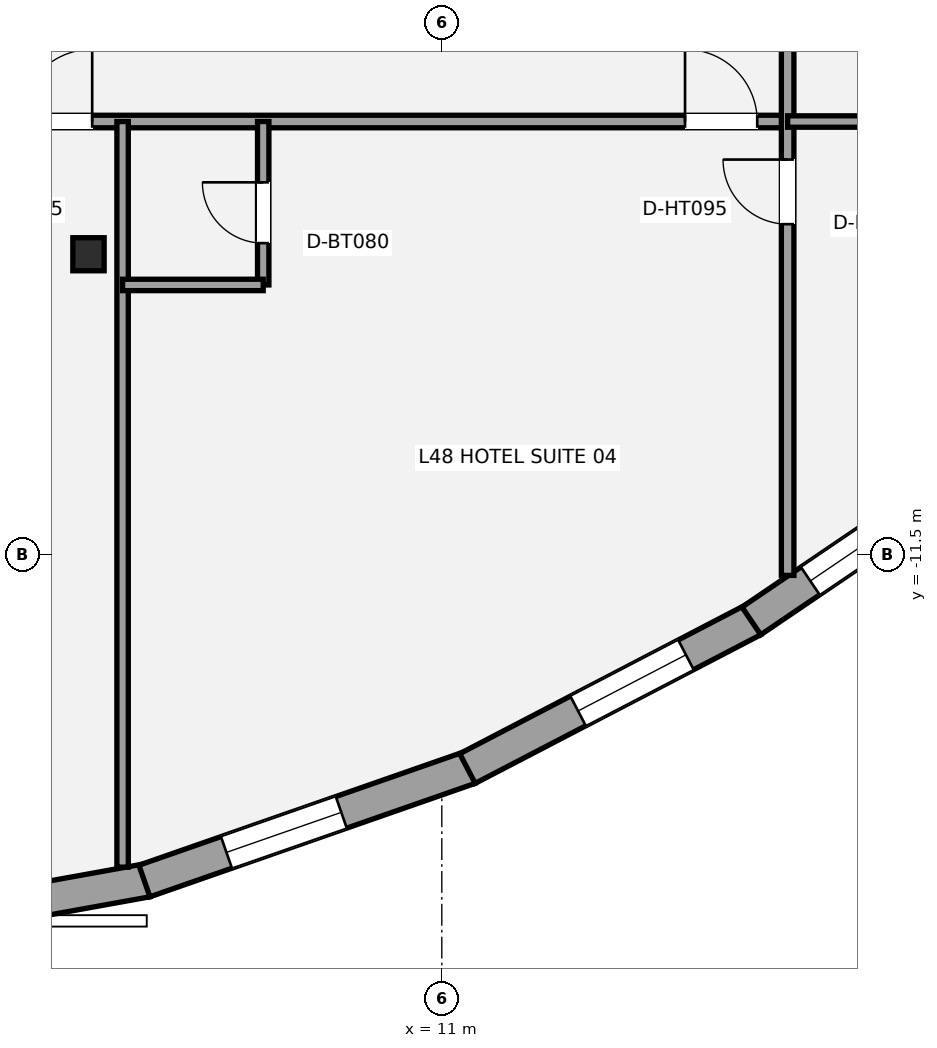
"""IFC4 building model, lengths in metres.
Left out: names, types, materials, properties, quantities, classifications, styles, units other than length and angle.
Written with IfcOpenShell. Run it as: python <this file> out.ifc"""

import sys

from ifc_helpers import new_model, si_unit, direction, frame, frame_2d, origin, origin_2d, place, context, subcontext, project, spatial, rectangle, i_section, extrude, element, fill, save


model = new_model("IFC4")
c1 = context("Model", 3, precision=1e-05, world=origin(), true_north=direction((0.0, 1.0)))
c2 = subcontext(c1, "Body", "Model", "MODEL_VIEW")
j1 = project(units=[si_unit("LENGTHUNIT", "METRE"), si_unit("PLANEANGLEUNIT", "RADIAN")], contexts=[c1])
p1 = place(None, origin())
s1 = spatial("IfcSite", under=j1, at=p1, CompositionType="ELEMENT")
p2 = place(p1, origin())
s2 = spatial("IfcBuilding", under=s1, at=p2, CompositionType="ELEMENT")
p3 = place(p2, frame((0.0, 0.0, 175.8)))
s3 = spatial("IfcBuildingStorey", under=s2, at=p3, CompositionType="ELEMENT", Elevation=175.8)
p4 = place(p3, frame((6.351, -7.546, 0.0), z_axis=(0.0, 0.0, 1.0), x_axis=(1.0, 0.0, 0.0)))
e1 = element("IfcColumn", 1, at=p4, inside=s3, PredefinedType="COLUMN", context=c2, shape_type="SweptSolid", body=[
    extrude(i_section(OverallWidth=0.412, OverallDepth=0.435, WebThickness=0.036, FlangeThickness=0.057, at=origin_2d()), origin(), (0.0, 0.0, 1.0), 3.2),
])
p5 = place(p3, frame((7.12, -15.783, 0.0), z_axis=(0.0, 0.0, 1.0), x_axis=(-0.984108907768, -0.177565924803, 0.0)))
e2 = element("IfcWall", 2, at=p5, inside=s3, PredefinedType="STANDARD", context=c2, shape_type="SweptSolid", body=[
    extrude(rectangle(XDim=4.788, YDim=0.44, at=frame_2d((2.394, 0.0))), origin(), (0.0, 0.0, 1.0), 2.315),
])
p6 = place(p5, frame((1.345, 0.0, 0.58)))
e3 = element("IfcOpeningElement", 3, at=p6, cuts=e2, PredefinedType="OPENING", context=c2, shape_type="SweptSolid", body=[
    extrude(rectangle(XDim=1.6, YDim=1.55, at=frame_2d((0.8, 0.775))), frame((0.0, 0.23, 0.0), z_axis=(0.0, -1.0, 0.0), x_axis=(1.0, 0.0, 0.0)), (0.0, 0.0, 1.0), 0.46),
])
p7 = place(p3, frame((11.366, -14.3, 0.0), z_axis=(0.0, 0.0, 1.0), x_axis=(-0.944223944927, -0.329304026434, 0.0)))
e4 = element("IfcWall", 4, at=p7, inside=s3, PredefinedType="STANDARD", context=c2, shape_type="SweptSolid", body=[
    extrude(rectangle(XDim=4.532, YDim=0.44, at=frame_2d((2.266, 0.0))), origin(), (0.0, 0.0, 1.0), 2.315),
])
p8 = place(p7, frame((1.789, 0.0, 0.58)))
e5 = element("IfcOpeningElement", 5, at=p8, cuts=e4, PredefinedType="OPENING", context=c2, shape_type="SweptSolid", body=[
    extrude(rectangle(XDim=1.6, YDim=1.55, at=frame_2d((0.8, 0.775))), frame((0.0, 0.23, 0.0), z_axis=(0.0, -1.0, 0.0), x_axis=(1.0, 0.0, 0.0)), (0.0, 0.0, 1.0), 0.46),
])
p9 = place(p3, frame((15.094, -12.357, 0.0), z_axis=(0.0, 0.0, 1.0), x_axis=(-0.887117685078, -0.461543294634, 0.0)))
e6 = element("IfcWall", 6, at=p9, inside=s3, PredefinedType="STANDARD", context=c2, shape_type="SweptSolid", body=[
    extrude(rectangle(XDim=4.235, YDim=0.44, at=frame_2d((2.118, 0.0))), origin(), (0.0, 0.0, 1.0), 2.315),
])
p10 = place(p9, frame((0.995, 0.0, 0.58)))
e7 = element("IfcOpeningElement", 7, at=p10, cuts=e6, PredefinedType="OPENING", context=c2, shape_type="SweptSolid", body=[
    extrude(rectangle(XDim=1.6, YDim=1.55, at=frame_2d((0.8, 0.775))), frame((0.0, 0.23, 0.0), z_axis=(0.0, -1.0, 0.0), x_axis=(1.0, 0.0, 0.0)), (0.0, 0.0, 1.0), 0.46),
])
p11 = place(p3, frame((18.393, -10.119, 0.0), z_axis=(0.0, 0.0, 1.0), x_axis=(-0.827746348969, -0.561102469937, 0.0)))
e8 = element("IfcWall", 8, at=p11, inside=s3, PredefinedType="STANDARD", context=c2, shape_type="SweptSolid", body=[
    extrude(rectangle(XDim=4.011, YDim=0.44, at=frame_2d((2.006, 0.0))), origin(), (0.0, 0.0, 1.0), 2.315),
])
p12 = place(p11, frame((1.674, 0.0, 0.58)))
e9 = element("IfcOpeningElement", 9, at=p12, cuts=e8, PredefinedType="OPENING", context=c2, shape_type="SweptSolid", body=[
    extrude(rectangle(XDim=1.4, YDim=1.55, at=frame_2d((0.7, 0.775))), frame((0.0, 0.23, 0.0), z_axis=(0.0, -1.0, 0.0), x_axis=(1.0, 0.0, 0.0)), (0.0, 0.0, 1.0), 0.46),
])
p13 = place(p3, frame((-15.55, -5.8, 0.0), z_axis=(0.0, 0.0, 1.0), x_axis=(1.0, 0.0, 0.0)))
e10 = element("IfcWall", 10, at=p13, inside=s3, PredefinedType="PARTITIONING", context=c2, shape_type="SweptSolid", body=[
    extrude(rectangle(XDim=31.1, YDim=0.165, at=frame_2d((15.55, 0.0))), origin(), (0.0, 0.0, 1.0), 2.398),
])
p14 = place(p13, frame((5.4, 0.0, 0.0)))
e11 = element("IfcOpeningElement", 11, at=p14, cuts=e10, PredefinedType="OPENING", context=c2, shape_type="SweptSolid", body=[
    extrude(rectangle(XDim=0.95, YDim=2.15, at=frame_2d((0.475, 1.075))), frame((0.0, 0.093, 0.0), z_axis=(0.0, -1.0, 0.0), x_axis=(1.0, 0.0, 0.0)), (0.0, 0.0, 1.0), 0.185),
])
p15 = place(p13, frame((13.2, 0.0, 0.0)))
e12 = element("IfcOpeningElement", 12, at=p15, cuts=e10, PredefinedType="OPENING", context=c2, shape_type="SweptSolid", body=[
    extrude(rectangle(XDim=0.95, YDim=2.15, at=frame_2d((0.475, 1.075))), frame((0.0, 0.093, 0.0), z_axis=(0.0, -1.0, 0.0), x_axis=(1.0, 0.0, 0.0)), (0.0, 0.0, 1.0), 0.185),
])
p16 = place(p13, frame((21.0, 0.0, 0.0)))
e13 = element("IfcOpeningElement", 13, at=p16, cuts=e10, PredefinedType="OPENING", context=c2, shape_type="SweptSolid", body=[
    extrude(rectangle(XDim=0.95, YDim=2.15, at=frame_2d((0.475, 1.075))), frame((0.0, 0.093, 0.0), z_axis=(0.0, -1.0, 0.0), x_axis=(1.0, 0.0, 0.0)), (0.0, 0.0, 1.0), 0.185),
])
p17 = place(p13, frame((29.75, 0.0, 0.0)))
e14 = element("IfcOpeningElement", 14, at=p17, cuts=e10, PredefinedType="OPENING", context=c2, shape_type="SweptSolid", body=[
    extrude(rectangle(XDim=0.95, YDim=2.15, at=frame_2d((0.475, 1.075))), frame((0.0, 0.093, 0.0), z_axis=(0.0, -1.0, 0.0), x_axis=(1.0, 0.0, 0.0)), (0.0, 0.0, 1.0), 0.185),
])
p18 = place(p3, frame((15.55, -11.771, 0.0), z_axis=(0.0, 0.0, 1.0), x_axis=(0.0, 1.0, 0.0)))
e15 = element("IfcWall", 15, at=p18, inside=s3, PredefinedType="PARTITIONING", context=c2, shape_type="SweptSolid", body=[
    extrude(rectangle(XDim=19.321, YDim=0.165, at=frame_2d((9.661, 0.0))), origin(), (0.0, 0.0, 1.0), 2.473),
])
p19 = place(p18, frame((4.621, 0.0, 0.0)))
e16 = element("IfcOpeningElement", 16, at=p19, cuts=e15, PredefinedType="OPENING", context=c2, shape_type="SweptSolid", body=[
    extrude(rectangle(XDim=0.85, YDim=2.1, at=frame_2d((0.425, 1.05))), frame((0.0, 0.093, 0.0), z_axis=(0.0, -1.0, 0.0), x_axis=(1.0, 0.0, 0.0)), (0.0, 0.0, 1.0), 0.185),
])
p20 = place(p18, frame((7.771, 0.0, 0.0)))
e17 = element("IfcOpeningElement", 17, at=p20, cuts=e15, PredefinedType="OPENING", context=c2, shape_type="SweptSolid", body=[
    extrude(rectangle(XDim=1.0, YDim=2.15, at=frame_2d((0.5, 1.075))), frame((0.0, 0.093, 0.0), z_axis=(0.0, -1.0, 0.0), x_axis=(1.0, 0.0, 0.0)), (0.0, 0.0, 1.0), 0.185),
])
p21 = place(p18, frame((12.172, 0.0, 0.0)))
e18 = element("IfcOpeningElement", 18, at=p21, cuts=e15, PredefinedType="OPENING", context=c2, shape_type="SweptSolid", body=[
    extrude(rectangle(XDim=1.0, YDim=2.15, at=frame_2d((0.5, 1.075))), frame((0.0, 0.093, 0.0), z_axis=(0.0, -1.0, 0.0), x_axis=(1.0, 0.0, 0.0)), (0.0, 0.0, 1.0), 0.185),
])
p22 = place(p18, frame((16.547, 0.0, 0.0)))
e19 = element("IfcOpeningElement", 19, at=p22, cuts=e15, PredefinedType="OPENING", context=c2, shape_type="SweptSolid", body=[
    extrude(rectangle(XDim=1.0, YDim=2.15, at=frame_2d((0.5, 1.075))), frame((0.0, 0.093, 0.0), z_axis=(0.0, -1.0, 0.0), x_axis=(1.0, 0.0, 0.0)), (0.0, 0.0, 1.0), 0.185),
])
p23 = place(p3, frame((15.55, -5.8, 0.0), z_axis=(0.0, 0.0, 1.0), x_axis=(1.0, 0.0, 0.0)))
e20 = element("IfcWall", 20, at=p23, inside=s3, PredefinedType="PLUMBINGWALL", context=c2, shape_type="SweptSolid", body=[
    extrude(rectangle(XDim=6.771, YDim=0.15, at=frame_2d((3.385, 0.0))), origin(), (0.0, 0.0, 1.0), 2.473),
])
p24 = place(p3, frame((6.8, -15.609, 0.0), z_axis=(0.0, 0.0, 1.0), x_axis=(0.0, 1.0, 0.0)))
e21 = element("IfcWall", 21, at=p24, inside=s3, PredefinedType="PLUMBINGWALL", context=c2, shape_type="SweptSolid", body=[
    extrude(rectangle(XDim=9.809, YDim=0.15, at=frame_2d((4.905, 0.0))), origin(), (0.0, 0.0, 1.0), 2.473),
])
p25 = place(p3, frame((8.65, -7.95, 0.0), z_axis=(0.0, 0.0, 1.0), x_axis=(0.0, 1.0, 0.0)))
e22 = element("IfcWall", 22, at=p25, inside=s3, PredefinedType="PLUMBINGWALL", context=c2, shape_type="SweptSolid", body=[
    extrude(rectangle(XDim=2.15, YDim=0.15, at=frame_2d((1.075, 0.0))), origin(), (0.0, 0.0, 1.0), 3.02),
])
p26 = place(p25, frame((0.55, 0.0, 0.0)))
e23 = element("IfcOpeningElement", 23, at=p26, cuts=e22, PredefinedType="OPENING", context=c2, shape_type="SweptSolid", body=[
    extrude(rectangle(XDim=0.8, YDim=2.1, at=frame_2d((0.4, 1.05))), frame((0.0, 0.085, 0.0), z_axis=(0.0, -1.0, 0.0), x_axis=(1.0, 0.0, 0.0)), (0.0, 0.0, 1.0), 0.17),
])
p27 = place(p3, frame((6.8, -7.95, 0.0), z_axis=(0.0, 0.0, 1.0), x_axis=(1.0, 0.0, 0.0)))
e24 = element("IfcWall", 24, at=p27, inside=s3, PredefinedType="PLUMBINGWALL", context=c2, shape_type="SweptSolid", body=[
    extrude(rectangle(XDim=1.85, YDim=0.15, at=frame_2d((0.925, 0.0))), origin(), (0.0, 0.0, 1.0), 3.02),
])
p28 = place(p8, origin())
e25 = element("IfcWindow", 25, at=p28, inside=s3, PartitioningType="SINGLE_PANEL", PredefinedType="WINDOW", context=c2, shape_type="SweptSolid", body=[
    extrude(rectangle(XDim=1.6, YDim=1.55, at=frame_2d((0.8, 0.775))), frame((0.0, -0.01, 0.0), z_axis=(0.0, -1.0, 0.0), x_axis=(1.0, 0.0, 0.0)), (0.0, 0.0, 1.0), 0.06),
])
fill(e5, e25)
p29 = place(p10, origin())
e26 = element("IfcWindow", 26, at=p29, inside=s3, PartitioningType="SINGLE_PANEL", PredefinedType="WINDOW", context=c2, shape_type="SweptSolid", body=[
    extrude(rectangle(XDim=1.6, YDim=1.55, at=frame_2d((0.8, 0.775))), frame((0.0, -0.01, 0.0), z_axis=(0.0, -1.0, 0.0), x_axis=(1.0, 0.0, 0.0)), (0.0, 0.0, 1.0), 0.06),
])
fill(e7, e26)
p30 = place(p12, origin())
e27 = element("IfcWindow", 27, at=p30, inside=s3, PartitioningType="SINGLE_PANEL", PredefinedType="WINDOW", context=c2, shape_type="SweptSolid", body=[
    extrude(rectangle(XDim=1.4, YDim=1.55, at=frame_2d((0.7, 0.775))), frame((0.0, -0.01, 0.0), z_axis=(0.0, -1.0, 0.0), x_axis=(1.0, 0.0, 0.0)), (0.0, 0.0, 1.0), 0.06),
])
fill(e9, e27)
p31 = place(p19, origin())
e28 = element("IfcDoor", 28, at=p31, inside=s3, OperationType="SINGLE_SWING_RIGHT", PredefinedType="DOOR", context=c2, shape_type="SweptSolid", body=[
    extrude(rectangle(XDim=0.85, YDim=2.1, at=frame_2d((0.425, 1.05))), frame((0.0, 0.025, 0.0), z_axis=(0.0, -1.0, 0.0), x_axis=(1.0, 0.0, 0.0)), (0.0, 0.0, 1.0), 0.05),
])
fill(e16, e28)
p32 = place(p16, origin())
e29 = element("IfcDoor", 29, at=p32, inside=s3, OperationType="SINGLE_SWING_RIGHT", PredefinedType="DOOR", context=c2, shape_type="SweptSolid", body=[
    extrude(rectangle(XDim=0.95, YDim=2.15, at=frame_2d((0.475, 1.075))), frame((0.0, 0.025, 0.0), z_axis=(0.0, -1.0, 0.0), x_axis=(1.0, 0.0, 0.0)), (0.0, 0.0, 1.0), 0.05),
])
fill(e13, e29)
p33 = place(p17, origin())
e30 = element("IfcDoor", 30, at=p33, inside=s3, OperationType="SINGLE_SWING_LEFT", PredefinedType="DOOR", context=c2, shape_type="SweptSolid", body=[
    extrude(rectangle(XDim=0.95, YDim=2.15, at=frame_2d((0.475, 1.075))), frame((0.0, 0.025, 0.0), z_axis=(0.0, -1.0, 0.0), x_axis=(1.0, 0.0, 0.0)), (0.0, 0.0, 1.0), 0.05),
])
fill(e14, e30)
p34 = place(p26, origin())
e31 = element("IfcDoor", 31, at=p34, inside=s3, OperationType="SINGLE_SWING_RIGHT", PredefinedType="DOOR", context=c2, shape_type="SweptSolid", body=[
    extrude(rectangle(XDim=0.8, YDim=2.1, at=frame_2d((0.4, 1.05))), frame((0.0, 0.025, 0.0), z_axis=(0.0, -1.0, 0.0), x_axis=(1.0, 0.0, 0.0)), (0.0, 0.0, 1.0), 0.05),
])
fill(e23, e31)
save(model, sys.argv[1])
